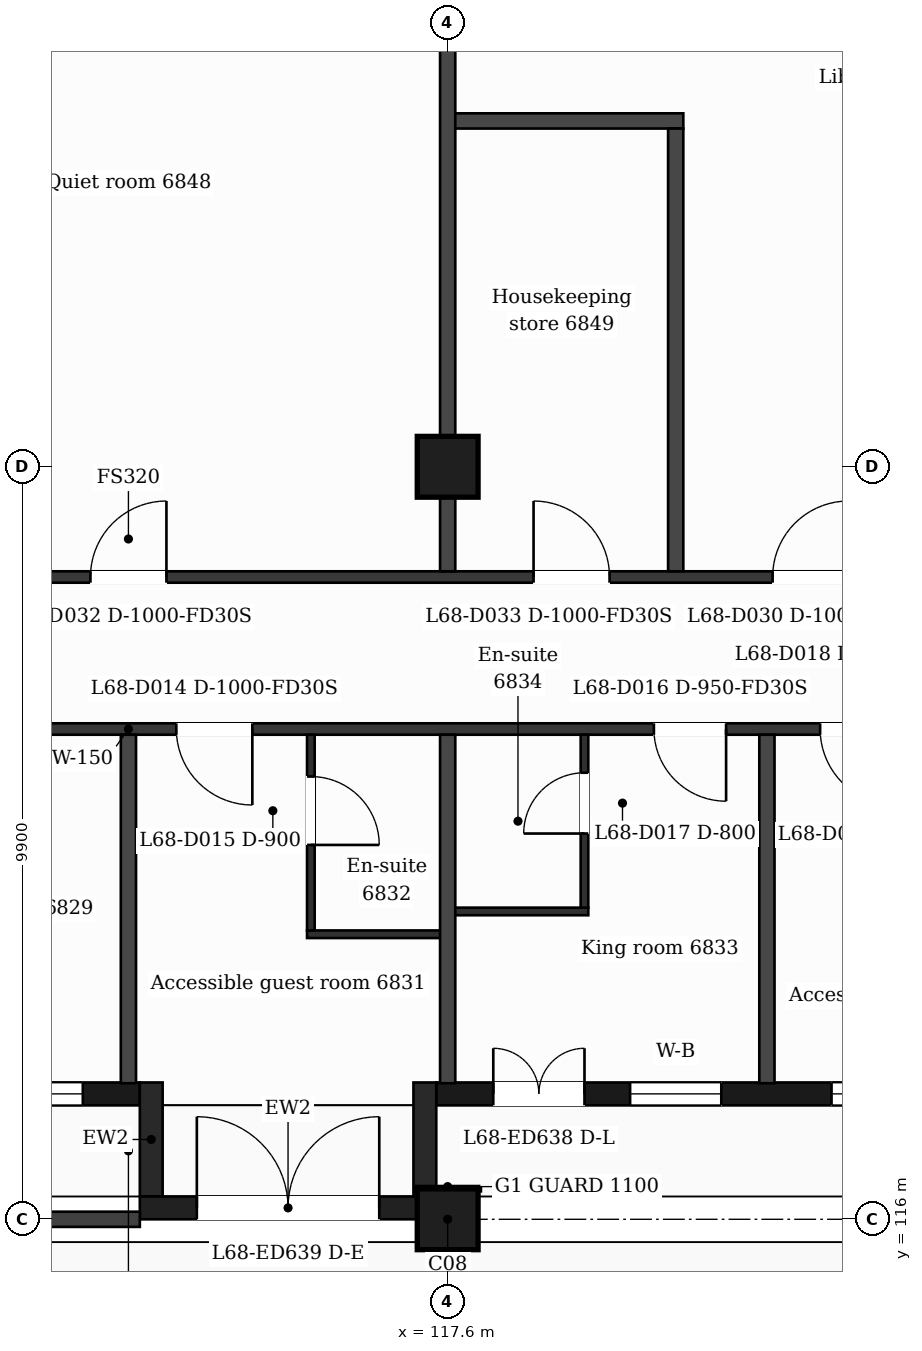
"""IFC4 building model, lengths in metres.
Left out: names, types, materials, properties, quantities, classifications, styles, units other than length and angle.
Written with IfcOpenShell. Run it as: python <this file> out.ifc"""

import sys

from ifc_helpers import new_model, si_unit, direction, frame, frame_2d, origin, origin_2d, place, context, subcontext, project, spatial, rectangle, extrude, element, fill, save


model = new_model("IFC4")
c1 = context("Model", 3, precision=1e-05, world=origin(), true_north=direction((0.0, 1.0)))
c2 = subcontext(c1, "Body", "Model", "MODEL_VIEW")
j1 = project(units=[si_unit("LENGTHUNIT", "METRE"), si_unit("PLANEANGLEUNIT", "RADIAN")], contexts=[c1])
p1 = place(None, origin())
s1 = spatial("IfcSite", under=j1, at=p1, CompositionType="ELEMENT")
p2 = place(p1, origin())
s2 = spatial("IfcBuilding", under=s1, at=p2, CompositionType="ELEMENT")
p3 = place(p2, frame((0.0, 0.0, 281.2)))
s3 = spatial("IfcBuildingStorey", under=s2, at=p3, CompositionType="ELEMENT", Elevation=281.2)
for number, where, z_axis, x_axis in (
    (1, (117.6, 116.0, 0.0), (0.0, 0.0, 1.0), (1.0, 0.0, 0.0)),
    (2, (117.6, 125.9, 0.0), (0.0, 0.0, 1.0), (1.0, 0.0, 0.0)),
):
    element("IfcColumn", number, at=place(p3, frame(where, z_axis=z_axis, x_axis=x_axis)), inside=s3, PredefinedType="COLUMN", context=c2, shape_type="SweptSolid", body=[
        extrude(rectangle(XDim=0.8, YDim=0.8, at=origin_2d()), origin(), (0.0, 0.0, 1.0), 3.7),
    ])
p4 = place(p3, frame((100.8, 117.65, 0.0), z_axis=(0.0, 0.0, 1.0), x_axis=(1.0, 0.0, 0.0)))
e3 = element("IfcWall", 3, at=p4, inside=s3, PredefinedType="SOLIDWALL", context=c2, shape_type="SweptSolid", body=[
    extrude(rectangle(XDim=12.75, YDim=0.3, at=frame_2d((6.375, 0.0))), origin(), (0.0, 0.0, 1.0), 3.38),
])
p5 = place(p4, frame((1.55, 0.0, 0.9)))
e4 = element("IfcOpeningElement", 4, at=p5, cuts=e3, PredefinedType="OPENING", context=c2, shape_type="SweptSolid", body=[
    extrude(rectangle(XDim=1.2, YDim=2.1, at=frame_2d((0.6, 1.05))), frame((0.0, 0.16, 0.0), z_axis=(0.0, -1.0, 0.0), x_axis=(1.0, 0.0, 0.0)), (0.0, 0.0, 1.0), 0.32),
])
p6 = place(p4, frame((5.7, 0.0, 0.9)))
e5 = element("IfcOpeningElement", 5, at=p6, cuts=e3, PredefinedType="OPENING", context=c2, shape_type="SweptSolid", body=[
    extrude(rectangle(XDim=1.2, YDim=2.1, at=frame_2d((0.6, 1.05))), frame((0.0, 0.16, 0.0), z_axis=(0.0, -1.0, 0.0), x_axis=(1.0, 0.0, 0.0)), (0.0, 0.0, 1.0), 0.32),
])
p7 = place(p4, frame((9.0, 0.0, 0.0)))
e6 = element("IfcOpeningElement", 6, at=p7, cuts=e3, PredefinedType="OPENING", context=c2, shape_type="SweptSolid", body=[
    extrude(rectangle(XDim=1.2, YDim=2.4, at=frame_2d((0.6, 1.2))), frame((0.0, 0.16, 0.0), z_axis=(0.0, -1.0, 0.0), x_axis=(1.0, 0.0, 0.0)), (0.0, 0.0, 1.0), 0.32),
])
p8 = place(p4, frame((10.8, 0.0, 0.9)))
e7 = element("IfcOpeningElement", 7, at=p8, cuts=e3, PredefinedType="OPENING", context=c2, shape_type="SweptSolid", body=[
    extrude(rectangle(XDim=1.2, YDim=2.1, at=frame_2d((0.6, 1.05))), frame((0.0, 0.16, 0.0), z_axis=(0.0, -1.0, 0.0), x_axis=(1.0, 0.0, 0.0)), (0.0, 0.0, 1.0), 0.32),
])
p9 = place(p3, frame((117.45, 117.65, 0.0), z_axis=(0.0, 0.0, 1.0), x_axis=(1.0, 0.0, 0.0)))
e8 = element("IfcWall", 8, at=p9, inside=s3, PredefinedType="SOLIDWALL", context=c2, shape_type="SweptSolid", body=[
    extrude(rectangle(XDim=8.55, YDim=0.3, at=frame_2d((4.275, 0.0))), origin(), (0.0, 0.0, 1.0), 3.38),
])
p10 = place(p9, frame((0.75, 0.0, 0.0)))
e9 = element("IfcOpeningElement", 9, at=p10, cuts=e8, PredefinedType="OPENING", context=c2, shape_type="SweptSolid", body=[
    extrude(rectangle(XDim=1.2, YDim=2.4, at=frame_2d((0.6, 1.2))), frame((0.0, 0.16, 0.0), z_axis=(0.0, -1.0, 0.0), x_axis=(1.0, 0.0, 0.0)), (0.0, 0.0, 1.0), 0.32),
])
p11 = place(p9, frame((2.55, 0.0, 0.9)))
e10 = element("IfcOpeningElement", 10, at=p11, cuts=e8, PredefinedType="OPENING", context=c2, shape_type="SweptSolid", body=[
    extrude(rectangle(XDim=1.2, YDim=2.1, at=frame_2d((0.6, 1.05))), frame((0.0, 0.16, 0.0), z_axis=(0.0, -1.0, 0.0), x_axis=(1.0, 0.0, 0.0)), (0.0, 0.0, 1.0), 0.32),
])
p12 = place(p9, frame((5.2, 0.0, 0.9)))
e11 = element("IfcOpeningElement", 11, at=p12, cuts=e8, PredefinedType="OPENING", context=c2, shape_type="SweptSolid", body=[
    extrude(rectangle(XDim=2.4, YDim=2.1, at=frame_2d((1.2, 1.05))), frame((0.0, 0.16, 0.0), z_axis=(0.0, -1.0, 0.0), x_axis=(1.0, 0.0, 0.0)), (0.0, 0.0, 1.0), 0.32),
])
for number, where, z_axis, x_axis in (
    (12, (113.7, 117.8, 0.0), (0.0, 0.0, 1.0), (0.0, -1.0, 0.0)),
    (13, (117.3, 117.8, 0.0), (0.0, 0.0, 1.0), (0.0, -1.0, 0.0)),
):
    element("IfcWall", number, at=place(p3, frame(where, z_axis=z_axis, x_axis=x_axis)), inside=s3, PredefinedType="SOLIDWALL", context=c2, shape_type="SweptSolid", body=[
        extrude(rectangle(XDim=1.5, YDim=0.3, at=frame_2d((0.75, 0.0))), origin(), (0.0, 0.0, 1.0), 3.38),
    ])
p13 = place(p3, frame((113.55, 116.15, 0.0), z_axis=(0.0, 0.0, 1.0), x_axis=(1.0, 0.0, 0.0)))
e14 = element("IfcWall", 14, at=p13, inside=s3, PredefinedType="SOLIDWALL", context=c2, shape_type="SweptSolid", body=[
    extrude(rectangle(XDim=3.9, YDim=0.3, at=frame_2d((1.95, 0.0))), origin(), (0.0, 0.0, 1.0), 2.8),
])
p14 = place(p13, frame((0.75, 0.0, 0.0)))
e15 = element("IfcOpeningElement", 15, at=p14, cuts=e14, PredefinedType="OPENING", context=c2, shape_type="SweptSolid", body=[
    extrude(rectangle(XDim=2.4, YDim=2.4, at=frame_2d((1.2, 1.2))), frame((0.0, 0.16, 0.0), z_axis=(0.0, -1.0, 0.0), x_axis=(1.0, 0.0, 0.0)), (0.0, 0.0, 1.0), 0.32),
])
p15 = place(p3, frame((101.09, 116.0, 0.0), z_axis=(0.0, 0.0, 1.0), x_axis=(1.0, 0.0, 0.0)))
e16 = element("IfcWall", 16, at=p15, inside=s3, PredefinedType="PARTITIONING", context=c2, shape_type="SweptSolid", body=[
    extrude(rectangle(XDim=12.46, YDim=0.2, at=frame_2d((6.23, 0.0))), origin(), (0.0, 0.0, 1.0), 2.8),
])
p16 = place(p3, frame((115.75, 119.75, 0.0), z_axis=(0.0, 0.0, 1.0), x_axis=(1.0, 0.0, 0.0)))
e17 = element("IfcWall", 17, at=p16, inside=s3, PredefinedType="PARTITIONING", context=c2, shape_type="SweptSolid", body=[
    extrude(rectangle(XDim=1.85, YDim=0.1, at=frame_2d((0.925, 0.0))), origin(), (0.0, 0.0, 1.0), 3.38),
])
p17 = place(p3, frame((117.6, 120.05, 0.0), z_axis=(0.0, 0.0, 1.0), x_axis=(1.0, 0.0, 0.0)))
e18 = element("IfcWall", 18, at=p17, inside=s3, PredefinedType="PARTITIONING", context=c2, shape_type="SweptSolid", body=[
    extrude(rectangle(XDim=1.85, YDim=0.1, at=frame_2d((0.925, 0.0))), origin(), (0.0, 0.0, 1.0), 3.38),
])
p18 = place(p3, frame((100.8, 122.45, 0.0), z_axis=(0.0, 0.0, 1.0), x_axis=(1.0, 0.0, 0.0)))
e19 = element("IfcWall", 19, at=p18, inside=s3, PredefinedType="PARTITIONING", context=c2, shape_type="SweptSolid", body=[
    extrude(rectangle(XDim=25.2, YDim=0.15, at=frame_2d((12.6, 0.0))), origin(), (0.0, 0.0, 1.0), 3.38),
])
p19 = place(p18, frame((0.55, 0.0, 0.0)))
e20 = element("IfcOpeningElement", 20, at=p19, cuts=e19, PredefinedType="OPENING", context=c2, shape_type="SweptSolid", body=[
    extrude(rectangle(XDim=1.0, YDim=2.1, at=frame_2d((0.5, 1.05))), frame((0.0, 0.085, 0.0), z_axis=(0.0, -1.0, 0.0), x_axis=(1.0, 0.0, 0.0)), (0.0, 0.0, 1.0), 0.17),
])
p20 = place(p18, frame((9.375, 0.0, 0.0)))
e21 = element("IfcOpeningElement", 21, at=p20, cuts=e19, PredefinedType="OPENING", context=c2, shape_type="SweptSolid", body=[
    extrude(rectangle(XDim=1.0, YDim=2.1, at=frame_2d((0.5, 1.05))), frame((0.0, 0.085, 0.0), z_axis=(0.0, -1.0, 0.0), x_axis=(1.0, 0.0, 0.0)), (0.0, 0.0, 1.0), 0.17),
])
p21 = place(p18, frame((13.23, 0.0, 0.0)))
e22 = element("IfcOpeningElement", 22, at=p21, cuts=e19, PredefinedType="OPENING", context=c2, shape_type="SweptSolid", body=[
    extrude(rectangle(XDim=1.0, YDim=2.1, at=frame_2d((0.5, 1.05))), frame((0.0, 0.085, 0.0), z_axis=(0.0, -1.0, 0.0), x_axis=(1.0, 0.0, 0.0)), (0.0, 0.0, 1.0), 0.17),
])
p22 = place(p18, frame((19.513, 0.0, 0.0)))
e23 = element("IfcOpeningElement", 23, at=p22, cuts=e19, PredefinedType="OPENING", context=c2, shape_type="SweptSolid", body=[
    extrude(rectangle(XDim=0.95, YDim=2.1, at=frame_2d((0.475, 1.05))), frame((0.0, 0.085, 0.0), z_axis=(0.0, -1.0, 0.0), x_axis=(1.0, 0.0, 0.0)), (0.0, 0.0, 1.0), 0.17),
])
p23 = place(p18, frame((21.7, 0.0, 0.0)))
e24 = element("IfcOpeningElement", 24, at=p23, cuts=e19, PredefinedType="OPENING", context=c2, shape_type="SweptSolid", body=[
    extrude(rectangle(XDim=1.0, YDim=2.1, at=frame_2d((0.5, 1.05))), frame((0.0, 0.085, 0.0), z_axis=(0.0, -1.0, 0.0), x_axis=(1.0, 0.0, 0.0)), (0.0, 0.0, 1.0), 0.17),
])
p24 = place(p3, frame((100.8, 124.45, 0.0), z_axis=(0.0, 0.0, 1.0), x_axis=(1.0, 0.0, 0.0)))
e25 = element("IfcWall", 25, at=p24, inside=s3, PredefinedType="PARTITIONING", context=c2, shape_type="SweptSolid", body=[
    extrude(rectangle(XDim=25.2, YDim=0.15, at=frame_2d((12.6, 0.0))), origin(), (0.0, 0.0, 1.0), 3.38),
])
p25 = place(p24, frame((21.075, 0.0, 0.0)))
e26 = element("IfcOpeningElement", 26, at=p25, cuts=e25, PredefinedType="OPENING", context=c2, shape_type="SweptSolid", body=[
    extrude(rectangle(XDim=1.0, YDim=2.1, at=frame_2d((0.5, 1.05))), frame((0.0, 0.085, 0.0), z_axis=(0.0, -1.0, 0.0), x_axis=(1.0, 0.0, 0.0)), (0.0, 0.0, 1.0), 0.17),
])
p26 = place(p24, frame((5.375, 0.0, 0.0)))
e27 = element("IfcOpeningElement", 27, at=p26, cuts=e25, PredefinedType="OPENING", context=c2, shape_type="SweptSolid", body=[
    extrude(rectangle(XDim=1.0, YDim=2.1, at=frame_2d((0.5, 1.05))), frame((0.0, 0.085, 0.0), z_axis=(0.0, -1.0, 0.0), x_axis=(1.0, 0.0, 0.0)), (0.0, 0.0, 1.0), 0.17),
])
p27 = place(p24, frame((12.1, 0.0, 0.0)))
e28 = element("IfcOpeningElement", 28, at=p27, cuts=e25, PredefinedType="OPENING", context=c2, shape_type="SweptSolid", body=[
    extrude(rectangle(XDim=1.0, YDim=2.1, at=frame_2d((0.5, 1.05))), frame((0.0, 0.085, 0.0), z_axis=(0.0, -1.0, 0.0), x_axis=(1.0, 0.0, 0.0)), (0.0, 0.0, 1.0), 0.17),
])
p28 = place(p24, frame((17.93, 0.0, 0.0)))
e29 = element("IfcOpeningElement", 29, at=p28, cuts=e25, PredefinedType="OPENING", context=c2, shape_type="SweptSolid", body=[
    extrude(rectangle(XDim=1.0, YDim=2.1, at=frame_2d((0.5, 1.05))), frame((0.0, 0.085, 0.0), z_axis=(0.0, -1.0, 0.0), x_axis=(1.0, 0.0, 0.0)), (0.0, 0.0, 1.0), 0.17),
])
p29 = place(p3, frame((117.6, 130.45, 0.0), z_axis=(0.0, 0.0, 1.0), x_axis=(1.0, 0.0, 0.0)))
e30 = element("IfcWall", 30, at=p29, inside=s3, PredefinedType="PARTITIONING", context=c2, shape_type="SweptSolid", body=[
    extrude(rectangle(XDim=3.1, YDim=0.2, at=frame_2d((1.55, 0.0))), origin(), (0.0, 0.0, 1.0), 3.38),
])
p30 = place(p3, frame((113.4, 117.79, 0.0), z_axis=(0.0, 0.0, 1.0), x_axis=(0.0, 1.0, 0.0)))
e31 = element("IfcWall", 31, at=p30, inside=s3, PredefinedType="PARTITIONING", context=c2, shape_type="SweptSolid", body=[
    extrude(rectangle(XDim=4.585, YDim=0.2, at=frame_2d((2.292, 0.0))), origin(), (0.0, 0.0, 1.0), 3.38),
])
p31 = place(p3, frame((115.8, 119.8, 0.0), z_axis=(0.0, 0.0, 1.0), x_axis=(0.0, 1.0, 0.0)))
e32 = element("IfcWall", 32, at=p31, inside=s3, PredefinedType="PARTITIONING", context=c2, shape_type="SweptSolid", body=[
    extrude(rectangle(XDim=2.575, YDim=0.1, at=frame_2d((1.288, 0.0))), origin(), (0.0, 0.0, 1.0), 3.38),
])
p32 = place(p31, frame((1.125, 0.0, 0.0)))
e33 = element("IfcOpeningElement", 33, at=p32, cuts=e32, PredefinedType="OPENING", context=c2, shape_type="SweptSolid", body=[
    extrude(rectangle(XDim=0.9, YDim=2.1, at=frame_2d((0.45, 1.05))), frame((0.0, 0.06, 0.0), z_axis=(0.0, -1.0, 0.0), x_axis=(1.0, 0.0, 0.0)), (0.0, 0.0, 1.0), 0.12),
])
p33 = place(p3, frame((117.6, 117.79, 0.0), z_axis=(0.0, 0.0, 1.0), x_axis=(0.0, 1.0, 0.0)))
e34 = element("IfcWall", 34, at=p33, inside=s3, PredefinedType="PARTITIONING", context=c2, shape_type="SweptSolid", body=[
    extrude(rectangle(XDim=4.585, YDim=0.2, at=frame_2d((2.292, 0.0))), origin(), (0.0, 0.0, 1.0), 3.38),
])
p34 = place(p3, frame((117.6, 124.525, 0.0), z_axis=(0.0, 0.0, 1.0), x_axis=(0.0, 1.0, 0.0)))
e35 = element("IfcWall", 35, at=p34, inside=s3, PredefinedType="PARTITIONING", context=c2, shape_type="SweptSolid", body=[
    extrude(rectangle(XDim=9.2, YDim=0.2, at=frame_2d((4.6, 0.0))), origin(), (0.0, 0.0, 1.0), 3.38),
])
p35 = place(p3, frame((119.4, 120.1, 0.0), z_axis=(0.0, 0.0, 1.0), x_axis=(0.0, 1.0, 0.0)))
e36 = element("IfcWall", 36, at=p35, inside=s3, PredefinedType="PARTITIONING", context=c2, shape_type="SweptSolid", body=[
    extrude(rectangle(XDim=2.275, YDim=0.1, at=frame_2d((1.137, 0.0))), origin(), (0.0, 0.0, 1.0), 3.38),
])
p36 = place(p35, frame((0.975, 0.0, 0.0)))
e37 = element("IfcOpeningElement", 37, at=p36, cuts=e36, PredefinedType="OPENING", context=c2, shape_type="SweptSolid", body=[
    extrude(rectangle(XDim=0.8, YDim=2.1, at=frame_2d((0.4, 1.05))), frame((0.0, 0.06, 0.0), z_axis=(0.0, -1.0, 0.0), x_axis=(1.0, 0.0, 0.0)), (0.0, 0.0, 1.0), 0.12),
])
p37 = place(p3, frame((120.6, 124.525, 0.0), z_axis=(0.0, 0.0, 1.0), x_axis=(0.0, 1.0, 0.0)))
e38 = element("IfcWall", 38, at=p37, inside=s3, PredefinedType="PARTITIONING", context=c2, shape_type="SweptSolid", body=[
    extrude(rectangle(XDim=5.825, YDim=0.2, at=frame_2d((2.913, 0.0))), origin(), (0.0, 0.0, 1.0), 3.38),
])
p38 = place(p3, frame((121.8, 117.79, 0.0), z_axis=(0.0, 0.0, 1.0), x_axis=(0.0, 1.0, 0.0)))
e39 = element("IfcWall", 39, at=p38, inside=s3, PredefinedType="PARTITIONING", context=c2, shape_type="SweptSolid", body=[
    extrude(rectangle(XDim=4.585, YDim=0.2, at=frame_2d((2.292, 0.0))), origin(), (0.0, 0.0, 1.0), 3.38),
])
p39 = place(p8, origin())
e40 = element("IfcWindow", 40, at=p39, inside=s3, PartitioningType="SINGLE_PANEL", PredefinedType="WINDOW", context=c2, shape_type="SweptSolid", body=[
    extrude(rectangle(XDim=1.2, YDim=2.1, at=frame_2d((0.6, 1.05))), frame((0.0, 0.03, 0.0), z_axis=(0.0, -1.0, 0.0), x_axis=(1.0, 0.0, 0.0)), (0.0, 0.0, 1.0), 0.06),
])
fill(e7, e40)
p40 = place(p10, origin())
e41 = element("IfcDoor", 41, at=p40, inside=s3, OperationType="DOUBLE_DOOR_SINGLE_SWING", PredefinedType="DOOR", context=c2, shape_type="SweptSolid", body=[
    extrude(rectangle(XDim=1.2, YDim=2.4, at=frame_2d((0.6, 1.2))), frame((0.0, 0.025, 0.0), z_axis=(0.0, -1.0, 0.0), x_axis=(1.0, 0.0, 0.0)), (0.0, 0.0, 1.0), 0.05),
])
fill(e9, e41)
p41 = place(p11, origin())
e42 = element("IfcWindow", 42, at=p41, inside=s3, PartitioningType="SINGLE_PANEL", PredefinedType="WINDOW", context=c2, shape_type="SweptSolid", body=[
    extrude(rectangle(XDim=1.2, YDim=2.1, at=frame_2d((0.6, 1.05))), frame((0.0, 0.03, 0.0), z_axis=(0.0, -1.0, 0.0), x_axis=(1.0, 0.0, 0.0)), (0.0, 0.0, 1.0), 0.06),
])
fill(e10, e42)
p42 = place(p12, origin())
e43 = element("IfcWindow", 43, at=p42, inside=s3, PartitioningType="SINGLE_PANEL", PredefinedType="WINDOW", context=c2, shape_type="SweptSolid", body=[
    extrude(rectangle(XDim=2.4, YDim=2.1, at=frame_2d((1.2, 1.05))), frame((0.0, 0.03, 0.0), z_axis=(0.0, -1.0, 0.0), x_axis=(1.0, 0.0, 0.0)), (0.0, 0.0, 1.0), 0.06),
])
fill(e11, e43)
p43 = place(p14, origin())
e44 = element("IfcDoor", 44, at=p43, inside=s3, OperationType="DOUBLE_DOOR_DOUBLE_SWING", PredefinedType="DOOR", context=c2, shape_type="SweptSolid", body=[
    extrude(rectangle(XDim=2.4, YDim=2.4, at=frame_2d((1.2, 1.2))), frame((0.0, 0.025, 0.0), z_axis=(0.0, -1.0, 0.0), x_axis=(1.0, 0.0, 0.0)), (0.0, 0.0, 1.0), 0.05),
])
fill(e15, e44)
p44 = place(p21, origin())
e45 = element("IfcDoor", 45, at=p44, inside=s3, OperationType="SINGLE_SWING_RIGHT", PredefinedType="DOOR", context=c2, shape_type="SweptSolid", body=[
    extrude(rectangle(XDim=1.0, YDim=2.1, at=frame_2d((0.5, 1.05))), frame((0.0, 0.025, 0.0), z_axis=(0.0, -1.0, 0.0), x_axis=(1.0, 0.0, 0.0)), (0.0, 0.0, 1.0), 0.05),
])
fill(e22, e45)
p45 = place(p32, origin())
e46 = element("IfcDoor", 46, at=p45, inside=s3, OperationType="SINGLE_SWING_LEFT", PredefinedType="DOOR", context=c2, shape_type="SweptSolid", body=[
    extrude(rectangle(XDim=0.9, YDim=2.1, at=frame_2d((0.45, 1.05))), frame((0.0, 0.025, 0.0), z_axis=(0.0, -1.0, 0.0), x_axis=(1.0, 0.0, 0.0)), (0.0, 0.0, 1.0), 0.05),
])
fill(e33, e46)
p46 = place(p22, origin())
e47 = element("IfcDoor", 47, at=p46, inside=s3, OperationType="SINGLE_SWING_RIGHT", PredefinedType="DOOR", context=c2, shape_type="SweptSolid", body=[
    extrude(rectangle(XDim=0.95, YDim=2.1, at=frame_2d((0.475, 1.05))), frame((0.0, 0.025, 0.0), z_axis=(0.0, -1.0, 0.0), x_axis=(1.0, 0.0, 0.0)), (0.0, 0.0, 1.0), 0.05),
])
fill(e23, e47)
p47 = place(p36, origin())
e48 = element("IfcDoor", 48, at=p47, inside=s3, OperationType="SINGLE_SWING_LEFT", PredefinedType="DOOR", context=c2, shape_type="SweptSolid", body=[
    extrude(rectangle(XDim=0.8, YDim=2.1, at=frame_2d((0.4, 1.05))), frame((0.0, 0.025, 0.0), z_axis=(0.0, -1.0, 0.0), x_axis=(1.0, 0.0, 0.0)), (0.0, 0.0, 1.0), 0.05),
])
fill(e37, e48)
p48 = place(p23, origin())
e49 = element("IfcDoor", 49, at=p48, inside=s3, OperationType="SINGLE_SWING_RIGHT", PredefinedType="DOOR", context=c2, shape_type="SweptSolid", body=[
    extrude(rectangle(XDim=1.0, YDim=2.1, at=frame_2d((0.5, 1.05))), frame((0.0, 0.025, 0.0), z_axis=(0.0, -1.0, 0.0), x_axis=(1.0, 0.0, 0.0)), (0.0, 0.0, 1.0), 0.05),
])
fill(e24, e49)
p49 = place(p25, origin())
e50 = element("IfcDoor", 50, at=p49, inside=s3, OperationType="SINGLE_SWING_RIGHT", PredefinedType="DOOR", context=c2, shape_type="SweptSolid", body=[
    extrude(rectangle(XDim=1.0, YDim=2.1, at=frame_2d((0.5, 1.05))), frame((0.0, 0.025, 0.0), z_axis=(0.0, -1.0, 0.0), x_axis=(1.0, 0.0, 0.0)), (0.0, 0.0, 1.0), 0.05),
])
fill(e26, e50)
p50 = place(p27, origin())
e51 = element("IfcDoor", 51, at=p50, inside=s3, OperationType="SINGLE_SWING_RIGHT", PredefinedType="DOOR", context=c2, shape_type="SweptSolid", body=[
    extrude(rectangle(XDim=1.0, YDim=2.1, at=frame_2d((0.5, 1.05))), frame((0.0, 0.025, 0.0), z_axis=(0.0, -1.0, 0.0), x_axis=(1.0, 0.0, 0.0)), (0.0, 0.0, 1.0), 0.05),
])
fill(e28, e51)
p51 = place(p28, origin())
e52 = element("IfcDoor", 52, at=p51, inside=s3, OperationType="SINGLE_SWING_LEFT", PredefinedType="DOOR", context=c2, shape_type="SweptSolid", body=[
    extrude(rectangle(XDim=1.0, YDim=2.1, at=frame_2d((0.5, 1.05))), frame((0.0, 0.025, 0.0), z_axis=(0.0, -1.0, 0.0), x_axis=(1.0, 0.0, 0.0)), (0.0, 0.0, 1.0), 0.05),
])
fill(e29, e52)
save(model, sys.argv[1])
